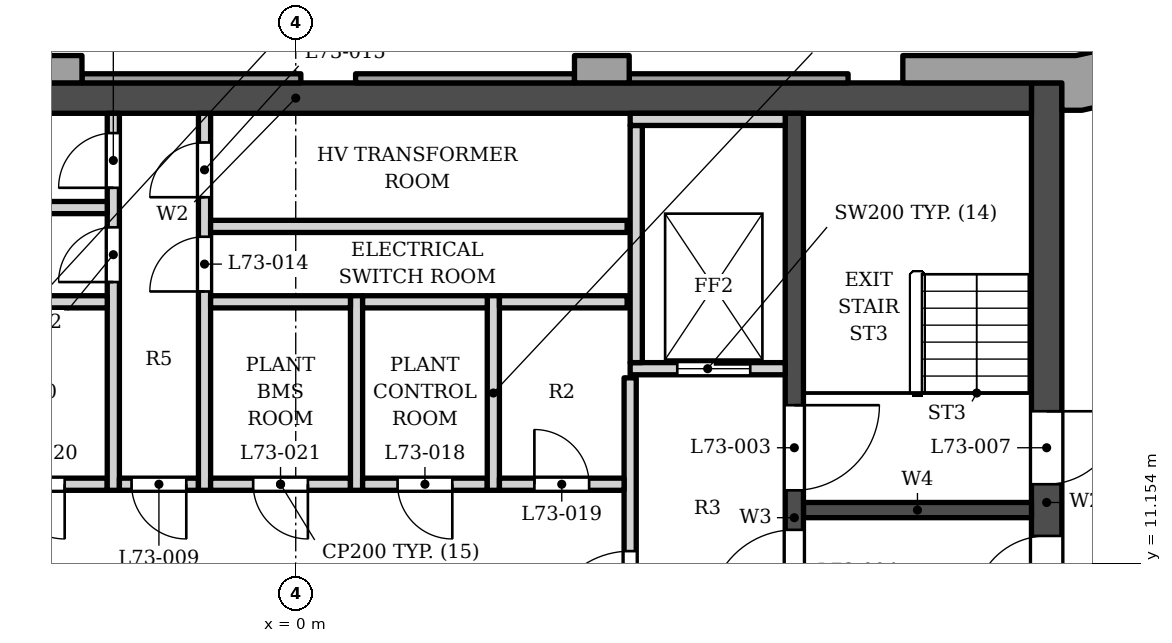
"""IFC4 building model, lengths in metres.
Left out: names, types, materials, properties, quantities, classifications, styles, units other than length and angle.
Written with IfcOpenShell. Run it as: python <this file> out.ifc"""

import sys

from ifc_helpers import new_model, si_unit, direction, frame, frame_2d, origin, place, context, subcontext, project, spatial, polyline, rectangle, outline, extrude, element, fill, save


model = new_model("IFC4")
c1 = context("Model", 3, precision=1e-05, world=origin(), true_north=direction((0.0, 1.0)))
c2 = subcontext(c1, "Body", "Model", "MODEL_VIEW")
j1 = project(units=[si_unit("LENGTHUNIT", "METRE"), si_unit("PLANEANGLEUNIT", "RADIAN")], contexts=[c1])
p1 = place(None, origin())
s1 = spatial("IfcSite", under=j1, at=p1, CompositionType="ELEMENT")
p2 = place(p1, origin())
s2 = spatial("IfcBuilding", under=s1, at=p2, CompositionType="ELEMENT")
p3 = place(p2, frame((0.0, 0.0, 310.5)))
s3 = spatial("IfcBuildingStorey", under=s2, at=p3, CompositionType="ELEMENT", Elevation=310.5)
p4 = place(p3, frame((-12.1, 18.802, 0.0), z_axis=(0.0, 0.0, 1.0), x_axis=(1.0, 0.0, 0.0)))
e1 = element("IfcWall", 1, at=p4, inside=s3, PredefinedType="SHEAR", context=c2, shape_type="SweptSolid", body=[
    extrude(rectangle(XDim=24.2, YDim=0.5, at=frame_2d((12.1, 0.0))), origin(), (0.0, 0.0, 1.0), 5.0),
])
p5 = place(p3, frame((12.35, 5.253, 0.0), z_axis=(0.0, 0.0, 1.0), x_axis=(0.0, 1.0, 0.0)))
e2 = element("IfcWall", 2, at=p5, inside=s3, PredefinedType="SHEAR", context=c2, shape_type="SweptSolid", body=[
    extrude(rectangle(XDim=13.8, YDim=0.5, at=frame_2d((6.9, 0.0))), origin(), (0.0, 0.0, 1.0), 5.0),
])
p6 = place(p5, frame((7.2, 0.0, 0.0)))
e3 = element("IfcOpeningElement", 3, at=p6, cuts=e2, PredefinedType="OPENING", context=c2, shape_type="SweptSolid", body=[
    extrude(rectangle(XDim=1.2, YDim=2.1, at=frame_2d((0.6, 1.05))), frame((0.0, 0.26, 0.0), z_axis=(0.0, -1.0, 0.0), x_axis=(1.0, 0.0, 0.0)), (0.0, 0.0, 1.0), 0.52),
])
p7 = place(p5, frame((5.15, 0.0, 0.0)))
e4 = element("IfcOpeningElement", 4, at=p7, cuts=e2, PredefinedType="OPENING", context=c2, shape_type="SweptSolid", body=[
    extrude(rectangle(XDim=1.2, YDim=2.1, at=frame_2d((0.6, 1.05))), frame((0.0, 0.26, 0.0), z_axis=(0.0, -1.0, 0.0), x_axis=(1.0, 0.0, 0.0)), (0.0, 0.0, 1.0), 0.52),
])
p8 = place(p3, frame((8.2, 5.253, 0.0), z_axis=(0.0, 0.0, 1.0), x_axis=(0.0, 1.0, 0.0)))
e5 = element("IfcWall", 5, at=p8, inside=s3, PredefinedType="SHEAR", context=c2, shape_type="SweptSolid", body=[
    extrude(rectangle(XDim=13.3, YDim=0.3, at=frame_2d((6.65, 0.0))), origin(), (0.0, 0.0, 1.0), 5.0),
])
p9 = place(p8, frame((7.1, 0.0, 0.0)))
e6 = element("IfcOpeningElement", 6, at=p9, cuts=e5, PredefinedType="OPENING", context=c2, shape_type="SweptSolid", body=[
    extrude(rectangle(XDim=1.4, YDim=2.1, at=frame_2d((0.7, 1.05))), frame((0.0, 0.16, 0.0), z_axis=(0.0, -1.0, 0.0), x_axis=(1.0, 0.0, 0.0)), (0.0, 0.0, 1.0), 0.32),
])
p10 = place(p8, frame((5.05, 0.0, 0.0)))
e7 = element("IfcOpeningElement", 7, at=p10, cuts=e5, PredefinedType="OPENING", context=c2, shape_type="SweptSolid", body=[
    extrude(rectangle(XDim=1.4, YDim=2.1, at=frame_2d((0.7, 1.05))), frame((0.0, 0.16, 0.0), z_axis=(0.0, -1.0, 0.0), x_axis=(1.0, 0.0, 0.0)), (0.0, 0.0, 1.0), 0.32),
])
p11 = place(p3, frame((8.35, 12.028, 0.0), z_axis=(0.0, 0.0, 1.0), x_axis=(1.0, 0.0, 0.0)))
e8 = element("IfcWall", 8, at=p11, inside=s3, PredefinedType="SHEAR", context=c2, shape_type="SweptSolid", body=[
    extrude(rectangle(XDim=3.75, YDim=0.25, at=frame_2d((1.875, 0.0))), origin(), (0.0, 0.0, 1.0), 5.0),
])
p12 = place(p3, origin())
e9 = element("IfcWall", 9, at=p12, inside=s3, PredefinedType="SOLIDWALL", context=c2, shape_type="SweptSolid", body=[
    extrude(outline(polyline([(4.584, 19.502), (4.584, 19.052), (5.484, 19.052), (5.484, 19.502), (4.584, 19.502)])), origin(), (0.0, 0.0, 1.0), 3.8),
])
p13 = place(p3, origin())
e10 = element("IfcWall", 10, at=p13, inside=s3, PredefinedType="SOLIDWALL", context=c2, shape_type="SweptSolid", body=[
    extrude(outline(polyline([(-4.416, 19.502), (-4.416, 19.052), (-3.516, 19.052), (-3.516, 19.502), (-4.416, 19.502)])), origin(), (0.0, 0.0, 1.0), 3.8),
])
p14 = place(p3, origin())
e11 = element("IfcWall", 11, at=p14, inside=s3, PredefinedType="ELEMENTEDWALL", context=c2, shape_type="SweptSolid", body=[
    extrude(outline(polyline([(9.084, 19.203), (5.484, 19.203), (5.484, 19.052), (9.084, 19.052), (9.084, 19.203)])), origin(), (0.0, 0.0, 1.0), 3.8),
])
p15 = place(p3, origin())
e12 = element("IfcWall", 12, at=p15, inside=s3, PredefinedType="ELEMENTEDWALL", context=c2, shape_type="SweptSolid", body=[
    extrude(outline(polyline([(4.584, 19.203), (0.984, 19.203), (0.984, 19.052), (4.584, 19.052), (4.584, 19.203)])), origin(), (0.0, 0.0, 1.0), 3.8),
])
p16 = place(p3, origin())
e13 = element("IfcWall", 13, at=p16, inside=s3, PredefinedType="ELEMENTEDWALL", context=c2, shape_type="SweptSolid", body=[
    extrude(outline(polyline([(0.084, 19.203), (-3.516, 19.203), (-3.516, 19.052), (0.084, 19.052), (0.084, 19.203)])), origin(), (0.0, 0.0, 1.0), 3.8),
])
p17 = place(p3, origin())
e14 = element("IfcWall", 14, at=p17, inside=s3, PredefinedType="SOLIDWALL", context=c2, shape_type="SweptSolid", body=[
    extrude(outline(polyline([(14.008, 19.761), (12.833, 19.502), (9.984, 19.502), (9.984, 19.052), (12.6, 19.052), (12.6, 18.603), (12.93, 18.603), (14.201, 18.883), (14.008, 19.761)])), origin(), (0.0, 0.0, 1.0), 3.8),
])
p18 = place(p3, frame((5.5, 6.353, 0.0), z_axis=(0.0, 0.0, 1.0), x_axis=(0.0, 1.0, 0.0)))
e15 = element("IfcWall", 15, at=p18, inside=s3, PredefinedType="SOLIDWALL", context=c2, shape_type="SweptSolid", body=[
    extrude(rectangle(XDim=7.85, YDim=0.2, at=frame_2d((3.925, 0.0))), origin(), (0.0, 0.0, 1.0), 4.8),
])
p19 = place(p18, frame((3.6, 0.0, 0.0)))
e16 = element("IfcOpeningElement", 16, at=p19, cuts=e15, PredefinedType="OPENING", context=c2, shape_type="SweptSolid", body=[
    extrude(rectangle(XDim=1.4, YDim=2.1, at=frame_2d((0.7, 1.05))), frame((0.0, 0.11, 0.0), z_axis=(0.0, -1.0, 0.0), x_axis=(1.0, 0.0, 0.0)), (0.0, 0.0, 1.0), 0.22),
])
p20 = place(p3, frame((-5.4, 12.453, 0.0), z_axis=(0.0, 0.0, 1.0), x_axis=(1.0, 0.0, 0.0)))
e17 = element("IfcWall", 17, at=p20, inside=s3, PredefinedType="PARTITIONING", context=c2, shape_type="SweptSolid", body=[
    extrude(rectangle(XDim=2.3, YDim=0.2, at=frame_2d((1.15, 0.0))), origin(), (0.0, 0.0, 1.0), 4.8),
])
p21 = place(p20, frame((0.7, 0.0, 0.0)))
e18 = element("IfcOpeningElement", 18, at=p21, cuts=e17, PredefinedType="OPENING", context=c2, shape_type="SweptSolid", body=[
    extrude(rectangle(XDim=0.9, YDim=2.1, at=frame_2d((0.45, 1.05))), frame((0.0, 0.11, 0.0), z_axis=(0.0, -1.0, 0.0), x_axis=(1.0, 0.0, 0.0)), (0.0, 0.0, 1.0), 0.22),
])
p22 = place(p3, frame((-3.0, 12.353, 0.0), z_axis=(0.0, 0.0, 1.0), x_axis=(0.0, 1.0, 0.0)))
e19 = element("IfcWall", 19, at=p22, inside=s3, PredefinedType="PARTITIONING", context=c2, shape_type="SweptSolid", body=[
    extrude(rectangle(XDim=6.2, YDim=0.2, at=frame_2d((3.1, 0.0))), origin(), (0.0, 0.0, 1.0), 4.8),
])
p23 = place(p22, frame((3.425, 0.0, 0.0)))
e20 = element("IfcOpeningElement", 20, at=p23, cuts=e19, PredefinedType="OPENING", context=c2, shape_type="SweptSolid", body=[
    extrude(rectangle(XDim=0.9, YDim=2.1, at=frame_2d((0.45, 1.05))), frame((0.0, 0.11, 0.0), z_axis=(0.0, -1.0, 0.0), x_axis=(1.0, 0.0, 0.0)), (0.0, 0.0, 1.0), 0.22),
])
p24 = place(p22, frame((4.975, 0.0, 0.0)))
e21 = element("IfcOpeningElement", 21, at=p24, cuts=e19, PredefinedType="OPENING", context=c2, shape_type="SweptSolid", body=[
    extrude(rectangle(XDim=0.9, YDim=2.1, at=frame_2d((0.45, 1.05))), frame((0.0, 0.11, 0.0), z_axis=(0.0, -1.0, 0.0), x_axis=(1.0, 0.0, 0.0)), (0.0, 0.0, 1.0), 0.22),
])
p25 = place(p3, frame((-2.9, 12.453, 0.0), z_axis=(0.0, 0.0, 1.0), x_axis=(1.0, 0.0, 0.0)))
e22 = element("IfcWall", 22, at=p25, inside=s3, PredefinedType="PARTITIONING", context=c2, shape_type="SweptSolid", body=[
    extrude(rectangle(XDim=1.3, YDim=0.2, at=frame_2d((0.65, 0.0))), origin(), (0.0, 0.0, 1.0), 4.8),
])
p26 = place(p25, frame((0.2, 0.0, 0.0)))
e23 = element("IfcOpeningElement", 23, at=p26, cuts=e22, PredefinedType="OPENING", context=c2, shape_type="SweptSolid", body=[
    extrude(rectangle(XDim=0.9, YDim=2.1, at=frame_2d((0.45, 1.05))), frame((0.0, 0.11, 0.0), z_axis=(0.0, -1.0, 0.0), x_axis=(1.0, 0.0, 0.0)), (0.0, 0.0, 1.0), 0.22),
])
p27 = place(p3, frame((-1.5, 12.353, 0.0), z_axis=(0.0, 0.0, 1.0), x_axis=(0.0, 1.0, 0.0)))
e24 = element("IfcWall", 24, at=p27, inside=s3, PredefinedType="PARTITIONING", context=c2, shape_type="SweptSolid", body=[
    extrude(rectangle(XDim=6.2, YDim=0.2, at=frame_2d((3.1, 0.0))), origin(), (0.0, 0.0, 1.0), 4.8),
])
p28 = place(p27, frame((3.27, 0.0, 0.0)))
e25 = element("IfcOpeningElement", 25, at=p28, cuts=e24, PredefinedType="OPENING", context=c2, shape_type="SweptSolid", body=[
    extrude(rectangle(XDim=0.9, YDim=2.1, at=frame_2d((0.45, 1.05))), frame((0.0, 0.11, 0.0), z_axis=(0.0, -1.0, 0.0), x_axis=(1.0, 0.0, 0.0)), (0.0, 0.0, 1.0), 0.22),
])
p29 = place(p27, frame((4.82, 0.0, 0.0)))
e26 = element("IfcOpeningElement", 26, at=p29, cuts=e24, PredefinedType="OPENING", context=c2, shape_type="SweptSolid", body=[
    extrude(rectangle(XDim=0.9, YDim=2.1, at=frame_2d((0.45, 1.05))), frame((0.0, 0.11, 0.0), z_axis=(0.0, -1.0, 0.0), x_axis=(1.0, 0.0, 0.0)), (0.0, 0.0, 1.0), 0.22),
])
p30 = place(p3, frame((-1.4, 12.453, 0.0), z_axis=(0.0, 0.0, 1.0), x_axis=(1.0, 0.0, 0.0)))
e27 = element("IfcWall", 27, at=p30, inside=s3, PredefinedType="PARTITIONING", context=c2, shape_type="SweptSolid", body=[
    extrude(rectangle(XDim=2.3, YDim=0.2, at=frame_2d((1.15, 0.0))), origin(), (0.0, 0.0, 1.0), 4.8),
])
p31 = place(p30, frame((0.7, 0.0, 0.0)))
e28 = element("IfcOpeningElement", 28, at=p31, cuts=e27, PredefinedType="OPENING", context=c2, shape_type="SweptSolid", body=[
    extrude(rectangle(XDim=0.9, YDim=2.1, at=frame_2d((0.45, 1.05))), frame((0.0, 0.11, 0.0), z_axis=(0.0, -1.0, 0.0), x_axis=(1.0, 0.0, 0.0)), (0.0, 0.0, 1.0), 0.22),
])
p32 = place(p3, frame((1.0, 12.353, 0.0), z_axis=(0.0, 0.0, 1.0), x_axis=(0.0, 1.0, 0.0)))
e29 = element("IfcWall", 29, at=p32, inside=s3, PredefinedType="PARTITIONING", context=c2, shape_type="SweptSolid", body=[
    extrude(rectangle(XDim=3.2, YDim=0.2, at=frame_2d((1.6, 0.0))), origin(), (0.0, 0.0, 1.0), 4.8),
])
p33 = place(p3, frame((1.1, 12.453, 0.0), z_axis=(0.0, 0.0, 1.0), x_axis=(1.0, 0.0, 0.0)))
e30 = element("IfcWall", 30, at=p33, inside=s3, PredefinedType="PARTITIONING", context=c2, shape_type="SweptSolid", body=[
    extrude(rectangle(XDim=2.05, YDim=0.2, at=frame_2d((1.025, 0.0))), origin(), (0.0, 0.0, 1.0), 4.8),
])
p34 = place(p33, frame((0.575, 0.0, 0.0)))
e31 = element("IfcOpeningElement", 31, at=p34, cuts=e30, PredefinedType="OPENING", context=c2, shape_type="SweptSolid", body=[
    extrude(rectangle(XDim=0.9, YDim=2.1, at=frame_2d((0.45, 1.05))), frame((0.0, 0.11, 0.0), z_axis=(0.0, -1.0, 0.0), x_axis=(1.0, 0.0, 0.0)), (0.0, 0.0, 1.0), 0.22),
])
p35 = place(p3, frame((3.25, 12.353, 0.0), z_axis=(0.0, 0.0, 1.0), x_axis=(0.0, 1.0, 0.0)))
e32 = element("IfcWall", 32, at=p35, inside=s3, PredefinedType="PARTITIONING", context=c2, shape_type="SweptSolid", body=[
    extrude(rectangle(XDim=3.2, YDim=0.2, at=frame_2d((1.6, 0.0))), origin(), (0.0, 0.0, 1.0), 4.8),
])
p36 = place(p3, frame((3.35, 12.453, 0.0), z_axis=(0.0, 0.0, 1.0), x_axis=(1.0, 0.0, 0.0)))
e33 = element("IfcWall", 33, at=p36, inside=s3, PredefinedType="PARTITIONING", context=c2, shape_type="SweptSolid", body=[
    extrude(rectangle(XDim=2.05, YDim=0.2, at=frame_2d((1.025, 0.0))), origin(), (0.0, 0.0, 1.0), 4.8),
])
p37 = place(p36, frame((0.575, 0.0, 0.0)))
e34 = element("IfcOpeningElement", 34, at=p37, cuts=e33, PredefinedType="OPENING", context=c2, shape_type="SweptSolid", body=[
    extrude(rectangle(XDim=0.9, YDim=2.1, at=frame_2d((0.45, 1.05))), frame((0.0, 0.11, 0.0), z_axis=(0.0, -1.0, 0.0), x_axis=(1.0, 0.0, 0.0)), (0.0, 0.0, 1.0), 0.22),
])
p38 = place(p3, frame((5.5, 14.353, 0.0), z_axis=(0.0, 0.0, 1.0), x_axis=(1.0, 0.0, 0.0)))
e35 = element("IfcWall", 35, at=p38, inside=s3, PredefinedType="SOLIDWALL", context=c2, shape_type="SweptSolid", body=[
    extrude(rectangle(XDim=2.55, YDim=0.2, at=frame_2d((1.275, 0.0))), origin(), (0.0, 0.0, 1.0), 4.8),
])
p39 = place(p38, frame((0.775, 0.0, 0.0)))
e36 = element("IfcOpeningElement", 36, at=p39, cuts=e35, PredefinedType="OPENING", context=c2, shape_type="SweptSolid", body=[
    extrude(rectangle(XDim=1.2, YDim=2.1, at=frame_2d((0.6, 1.05))), frame((0.0, 0.11, 0.0), z_axis=(0.0, -1.0, 0.0), x_axis=(1.0, 0.0, 0.0)), (0.0, 0.0, 1.0), 0.22),
])
p40 = place(p3, frame((5.6, 14.453, 0.0), z_axis=(0.0, 0.0, 1.0), x_axis=(0.0, 1.0, 0.0)))
e37 = element("IfcWall", 37, at=p40, inside=s3, PredefinedType="SOLIDWALL", context=c2, shape_type="SweptSolid", body=[
    extrude(rectangle(XDim=3.9, YDim=0.2, at=frame_2d((1.95, 0.0))), origin(), (0.0, 0.0, 1.0), 4.8),
])
p41 = place(p3, frame((-5.45, 15.453, 0.0), z_axis=(0.0, 0.0, 1.0), x_axis=(1.0, 0.0, 0.0)))
e38 = element("IfcWall", 38, at=p41, inside=s3, PredefinedType="SOLIDWALL", context=c2, shape_type="SweptSolid", body=[
    extrude(rectangle(XDim=2.35, YDim=0.2, at=frame_2d((1.175, 0.0))), origin(), (0.0, 0.0, 1.0), 4.8),
])
p42 = place(p3, frame((-1.4, 15.453, 0.0), z_axis=(0.0, 0.0, 1.0), x_axis=(1.0, 0.0, 0.0)))
e39 = element("IfcWall", 39, at=p42, inside=s3, PredefinedType="PARTITIONING", context=c2, shape_type="SweptSolid", body=[
    extrude(rectangle(XDim=2.3, YDim=0.2, at=frame_2d((1.15, 0.0))), origin(), (0.0, 0.0, 1.0), 4.8),
])
p43 = place(p3, frame((1.1, 15.453, 0.0), z_axis=(0.0, 0.0, 1.0), x_axis=(1.0, 0.0, 0.0)))
e40 = element("IfcWall", 40, at=p43, inside=s3, PredefinedType="PARTITIONING", context=c2, shape_type="SweptSolid", body=[
    extrude(rectangle(XDim=2.05, YDim=0.2, at=frame_2d((1.025, 0.0))), origin(), (0.0, 0.0, 1.0), 4.8),
])
p44 = place(p3, frame((3.35, 15.453, 0.0), z_axis=(0.0, 0.0, 1.0), x_axis=(1.0, 0.0, 0.0)))
e41 = element("IfcWall", 41, at=p44, inside=s3, PredefinedType="SOLIDWALL", context=c2, shape_type="SweptSolid", body=[
    extrude(rectangle(XDim=2.1, YDim=0.2, at=frame_2d((1.05, 0.0))), origin(), (0.0, 0.0, 1.0), 4.8),
])
p45 = place(p3, frame((-1.4, 16.693, 0.0), z_axis=(0.0, 0.0, 1.0), x_axis=(1.0, 0.0, 0.0)))
e42 = element("IfcWall", 42, at=p45, inside=s3, PredefinedType="SOLIDWALL", context=c2, shape_type="SweptSolid", body=[
    extrude(rectangle(XDim=6.85, YDim=0.2, at=frame_2d((3.425, 0.0))), origin(), (0.0, 0.0, 1.0), 4.8),
])
p46 = place(p3, frame((-5.45, 17.003, 0.0), z_axis=(0.0, 0.0, 1.0), x_axis=(1.0, 0.0, 0.0)))
e43 = element("IfcWall", 43, at=p46, inside=s3, PredefinedType="SOLIDWALL", context=c2, shape_type="SweptSolid", body=[
    extrude(rectangle(XDim=2.35, YDim=0.2, at=frame_2d((1.175, 0.0))), origin(), (0.0, 0.0, 1.0), 4.8),
])
p47 = place(p3, frame((5.5, 18.453, 0.0), z_axis=(0.0, 0.0, 1.0), x_axis=(1.0, 0.0, 0.0)))
e44 = element("IfcWall", 44, at=p47, inside=s3, PredefinedType="SOLIDWALL", context=c2, shape_type="SweptSolid", body=[
    extrude(rectangle(XDim=2.55, YDim=0.2, at=frame_2d((1.275, 0.0))), origin(), (0.0, 0.0, 1.0), 4.8),
])
p48 = place(p39, origin())
e45 = element("IfcDoor", 45, at=p48, inside=s3, OperationType="DOUBLE_DOOR_SLIDING", PredefinedType="DOOR", context=c2, shape_type="SweptSolid", body=[
    extrude(rectangle(XDim=1.2, YDim=2.1, at=frame_2d((0.6, 1.05))), frame((0.0, 0.025, 0.0), z_axis=(0.0, -1.0, 0.0), x_axis=(1.0, 0.0, 0.0)), (0.0, 0.0, 1.0), 0.05),
])
fill(e36, e45)
p49 = place(p9, origin())
e46 = element("IfcDoor", 46, at=p49, inside=s3, OperationType="SINGLE_SWING_RIGHT", PredefinedType="DOOR", context=c2, shape_type="SweptSolid", body=[
    extrude(rectangle(XDim=1.4, YDim=2.1, at=frame_2d((0.7, 1.05))), frame((0.0, 0.025, 0.0), z_axis=(0.0, -1.0, 0.0), x_axis=(1.0, 0.0, 0.0)), (0.0, 0.0, 1.0), 0.05),
])
fill(e6, e46)
p50 = place(p10, origin())
e47 = element("IfcDoor", 47, at=p50, inside=s3, OperationType="SINGLE_SWING_LEFT", PredefinedType="DOOR", context=c2, shape_type="SweptSolid", body=[
    extrude(rectangle(XDim=1.4, YDim=2.1, at=frame_2d((0.7, 1.05))), frame((0.0, 0.025, 0.0), z_axis=(0.0, -1.0, 0.0), x_axis=(1.0, 0.0, 0.0)), (0.0, 0.0, 1.0), 0.05),
])
fill(e7, e47)
p51 = place(p6, origin())
e48 = element("IfcDoor", 48, at=p51, inside=s3, OperationType="SINGLE_SWING_RIGHT", PredefinedType="DOOR", context=c2, shape_type="SweptSolid", body=[
    extrude(rectangle(XDim=1.2, YDim=2.1, at=frame_2d((0.6, 1.05))), frame((0.0, 0.025, 0.0), z_axis=(0.0, -1.0, 0.0), x_axis=(1.0, 0.0, 0.0)), (0.0, 0.0, 1.0), 0.05),
])
fill(e3, e48)
p52 = place(p7, origin())
e49 = element("IfcDoor", 49, at=p52, inside=s3, OperationType="SINGLE_SWING_LEFT", PredefinedType="DOOR", context=c2, shape_type="SweptSolid", body=[
    extrude(rectangle(XDim=1.2, YDim=2.1, at=frame_2d((0.6, 1.05))), frame((0.0, 0.025, 0.0), z_axis=(0.0, -1.0, 0.0), x_axis=(1.0, 0.0, 0.0)), (0.0, 0.0, 1.0), 0.05),
])
fill(e4, e49)
p53 = place(p26, origin())
e50 = element("IfcDoor", 50, at=p53, inside=s3, OperationType="SINGLE_SWING_RIGHT", PredefinedType="DOOR", context=c2, shape_type="SweptSolid", body=[
    extrude(rectangle(XDim=0.9, YDim=2.1, at=frame_2d((0.45, 1.05))), frame((0.0, 0.025, 0.0), z_axis=(0.0, -1.0, 0.0), x_axis=(1.0, 0.0, 0.0)), (0.0, 0.0, 1.0), 0.05),
])
fill(e23, e50)
p54 = place(p19, origin())
e51 = element("IfcDoor", 51, at=p54, inside=s3, OperationType="SINGLE_SWING_LEFT", PredefinedType="DOOR", context=c2, shape_type="SweptSolid", body=[
    extrude(rectangle(XDim=1.4, YDim=2.1, at=frame_2d((0.7, 1.05))), frame((0.0, 0.025, 0.0), z_axis=(0.0, -1.0, 0.0), x_axis=(1.0, 0.0, 0.0)), (0.0, 0.0, 1.0), 0.05),
])
fill(e16, e51)
p55 = place(p23, origin())
e52 = element("IfcDoor", 52, at=p55, inside=s3, OperationType="SINGLE_SWING_LEFT", PredefinedType="DOOR", context=c2, shape_type="SweptSolid", body=[
    extrude(rectangle(XDim=0.9, YDim=2.1, at=frame_2d((0.45, 1.05))), frame((0.0, 0.025, 0.0), z_axis=(0.0, -1.0, 0.0), x_axis=(1.0, 0.0, 0.0)), (0.0, 0.0, 1.0), 0.05),
])
fill(e20, e52)
p56 = place(p24, origin())
e53 = element("IfcDoor", 53, at=p56, inside=s3, OperationType="SINGLE_SWING_LEFT", PredefinedType="DOOR", context=c2, shape_type="SweptSolid", body=[
    extrude(rectangle(XDim=0.9, YDim=2.1, at=frame_2d((0.45, 1.05))), frame((0.0, 0.025, 0.0), z_axis=(0.0, -1.0, 0.0), x_axis=(1.0, 0.0, 0.0)), (0.0, 0.0, 1.0), 0.05),
])
fill(e21, e53)
p57 = place(p28, origin())
e54 = element("IfcDoor", 54, at=p57, inside=s3, OperationType="SINGLE_SWING_LEFT", PredefinedType="DOOR", context=c2, shape_type="SweptSolid", body=[
    extrude(rectangle(XDim=0.9, YDim=2.1, at=frame_2d((0.45, 1.05))), frame((0.0, 0.025, 0.0), z_axis=(0.0, -1.0, 0.0), x_axis=(1.0, 0.0, 0.0)), (0.0, 0.0, 1.0), 0.05),
])
fill(e25, e54)
p58 = place(p29, origin())
e55 = element("IfcDoor", 55, at=p58, inside=s3, OperationType="SINGLE_SWING_LEFT", PredefinedType="DOOR", context=c2, shape_type="SweptSolid", body=[
    extrude(rectangle(XDim=0.9, YDim=2.1, at=frame_2d((0.45, 1.05))), frame((0.0, 0.025, 0.0), z_axis=(0.0, -1.0, 0.0), x_axis=(1.0, 0.0, 0.0)), (0.0, 0.0, 1.0), 0.05),
])
fill(e26, e55)
p59 = place(p34, origin())
e56 = element("IfcDoor", 56, at=p59, inside=s3, OperationType="SINGLE_SWING_RIGHT", PredefinedType="DOOR", context=c2, shape_type="SweptSolid", body=[
    extrude(rectangle(XDim=0.9, YDim=2.1, at=frame_2d((0.45, 1.05))), frame((0.0, 0.025, 0.0), z_axis=(0.0, -1.0, 0.0), x_axis=(1.0, 0.0, 0.0)), (0.0, 0.0, 1.0), 0.05),
])
fill(e31, e56)
p60 = place(p37, origin())
e57 = element("IfcDoor", 57, at=p60, inside=s3, OperationType="SINGLE_SWING_LEFT", PredefinedType="DOOR", context=c2, shape_type="SweptSolid", body=[
    extrude(rectangle(XDim=0.9, YDim=2.1, at=frame_2d((0.45, 1.05))), frame((0.0, 0.025, 0.0), z_axis=(0.0, -1.0, 0.0), x_axis=(1.0, 0.0, 0.0)), (0.0, 0.0, 1.0), 0.05),
])
fill(e34, e57)
p61 = place(p21, origin())
e58 = element("IfcDoor", 58, at=p61, inside=s3, OperationType="SINGLE_SWING_RIGHT", PredefinedType="DOOR", context=c2, shape_type="SweptSolid", body=[
    extrude(rectangle(XDim=0.9, YDim=2.1, at=frame_2d((0.45, 1.05))), frame((0.0, 0.025, 0.0), z_axis=(0.0, -1.0, 0.0), x_axis=(1.0, 0.0, 0.0)), (0.0, 0.0, 1.0), 0.05),
])
fill(e18, e58)
p62 = place(p31, origin())
e59 = element("IfcDoor", 59, at=p62, inside=s3, OperationType="SINGLE_SWING_RIGHT", PredefinedType="DOOR", context=c2, shape_type="SweptSolid", body=[
    extrude(rectangle(XDim=0.9, YDim=2.1, at=frame_2d((0.45, 1.05))), frame((0.0, 0.025, 0.0), z_axis=(0.0, -1.0, 0.0), x_axis=(1.0, 0.0, 0.0)), (0.0, 0.0, 1.0), 0.05),
])
fill(e28, e59)
save(model, sys.argv[1])
